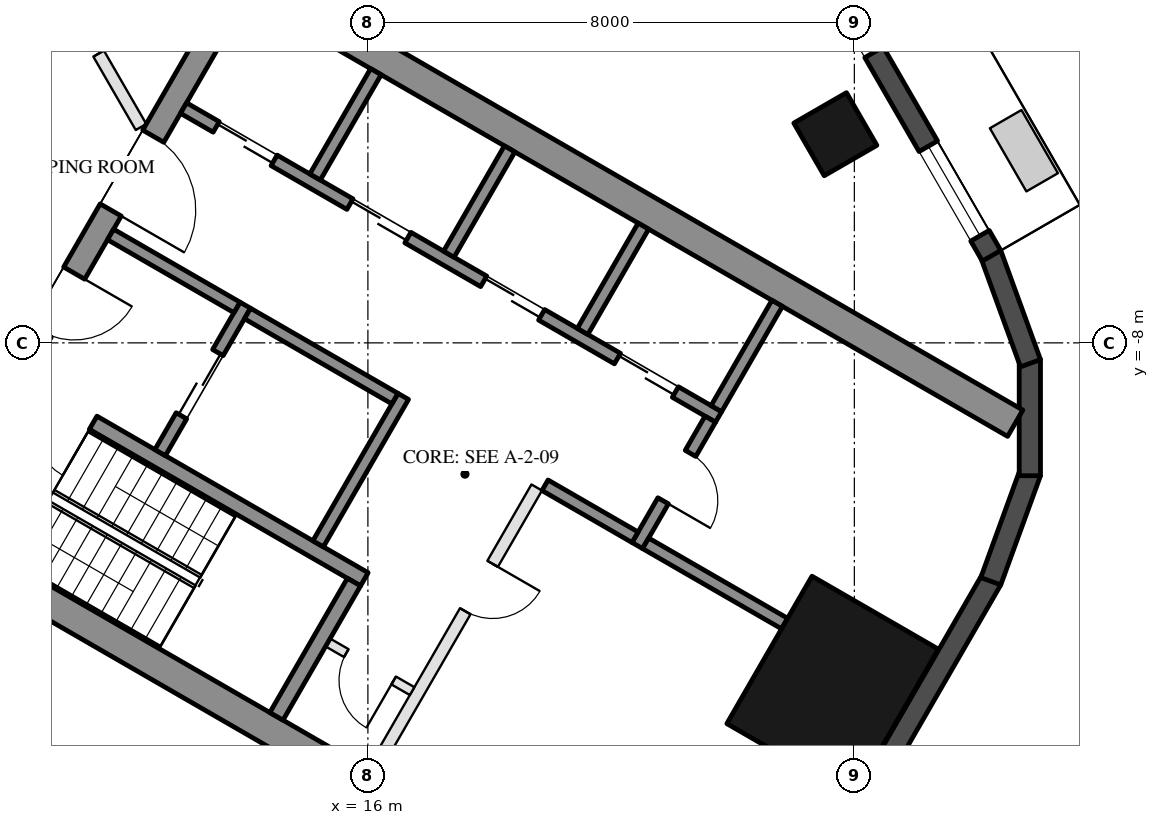
"""IFC4 building model, lengths in metres.
Left out: names, types, materials, properties, quantities, classifications, styles, units other than length and angle.
Written with IfcOpenShell. Run it as: python <this file> out.ifc"""

import sys

from ifc_helpers import new_model, si_unit, direction, frame, frame_2d, origin, origin_2d, place, context, subcontext, project, spatial, rectangle, hollow_rectangle, extrude, element, fill, save


model = new_model("IFC4")
c1 = context("Model", 3, precision=1e-05, world=origin(), true_north=direction((0.0, 1.0)))
c2 = subcontext(c1, "Body", "Model", "MODEL_VIEW")
j1 = project(units=[si_unit("LENGTHUNIT", "METRE"), si_unit("PLANEANGLEUNIT", "RADIAN")], contexts=[c1])
p1 = place(None, origin())
s1 = spatial("IfcSite", under=j1, at=p1, CompositionType="ELEMENT")
p2 = place(p1, origin())
s2 = spatial("IfcBuilding", under=s1, at=p2, CompositionType="ELEMENT")
p3 = place(p2, frame((0.0, 0.0, 46.5)))
s3 = spatial("IfcBuildingStorey", under=s2, at=p3, CompositionType="ELEMENT", Elevation=46.5)
p4 = place(p3, frame((23.688, -4.568, 0.0), z_axis=(0.0, 0.0, 1.0), x_axis=(-0.5, 0.866025403784, 0.0)))
e1 = element("IfcColumn", 1, at=p4, inside=s3, PredefinedType="COLUMN", context=c2, shape_type="SweptSolid", body=[
    extrude(hollow_rectangle(XDim=1.0, YDim=1.0, WallThickness=0.045, at=origin_2d()), origin(), (0.0, 0.0, 1.0), 3.7),
])
p5 = place(p3, frame((23.643, -13.65, 0.0), z_axis=(0.0, 0.0, 1.0), x_axis=(0.5, 0.866025403784, 0.0)))
e2 = element("IfcColumn", 2, at=p5, inside=s3, PredefinedType="COLUMN", context=c2, shape_type="SweptSolid", body=[
    extrude(hollow_rectangle(XDim=2.8, YDim=2.4, WallThickness=0.07, at=origin_2d()), origin(), (0.0, 0.0, 1.0), 3.7),
])
p6 = place(p3, frame((23.427, -16.792, 0.0), z_axis=(0.0, 0.0, 1.0), x_axis=(0.500018773155, 0.866014564827, 0.0)))
e3 = element("IfcWall", 3, at=p6, inside=s3, PredefinedType="SOLIDWALL", context=c2, shape_type="SweptSolid", body=[
    extrude(rectangle(XDim=5.658, YDim=0.35, at=frame_2d((2.829, 0.0))), origin(), (0.0, 0.0, 1.0), 3.55),
])
for number, where, z_axis, x_axis in (
    (4, (26.244, -11.92, 0.0), (0.0, 0.0, 1.0), (0.342, 0.94, 0.0)),
    (5, (26.886, -10.185, 0.0), (0.0, 0.0, 1.0), (0.0, 1.0, 0.0)),
    (6, (26.897, -8.335, 0.0), (0.0, 0.0, 1.0), (-0.342, 0.94, 0.0)),
):
    element("IfcWall", number, at=place(p3, frame(where, z_axis=z_axis, x_axis=x_axis)), inside=s3, PredefinedType="SOLIDWALL", context=c2, shape_type="SweptSolid", body=[
        extrude(rectangle(XDim=1.91, YDim=0.35, at=frame_2d((0.955, 0.0))), origin(), (0.0, 0.0, 1.0), 3.55),
    ])
p7 = place(p3, frame((26.257, -6.567, 0.0), z_axis=(0.0, 0.0, 1.0), x_axis=(-0.500023526245, 0.866011820475, 0.0)))
e7 = element("IfcWall", 7, at=p7, inside=s3, PredefinedType="SOLIDWALL", context=c2, shape_type="SweptSolid", body=[
    extrude(rectangle(XDim=11.816, YDim=0.35, at=frame_2d((5.908, 0.0))), origin(), (0.0, 0.0, 1.0), 3.55),
])
p8 = place(p7, frame((0.38, 0.0, 0.3)))
e8 = element("IfcOpeningElement", 8, at=p8, cuts=e7, PredefinedType="OPENING", context=c2, shape_type="SweptSolid", body=[
    extrude(rectangle(XDim=1.7, YDim=2.65, at=frame_2d((0.85, 1.325))), frame((0.0, 0.185, 0.0), z_axis=(0.0, -1.0, 0.0), x_axis=(1.0, 0.0, 0.0)), (0.0, 0.0, 1.0), 0.37),
])
p9 = place(p7, frame((7.666, 0.0, 0.0)))
e9 = element("IfcOpeningElement", 9, at=p9, cuts=e7, PredefinedType="OPENING", context=c2, shape_type="SweptSolid", body=[
    extrude(rectangle(XDim=2.4, YDim=2.4, at=frame_2d((1.2, 1.2))), frame((0.0, 0.185, 0.0), z_axis=(0.0, -1.0, 0.0), x_axis=(1.0, 0.0, 0.0)), (0.0, 0.0, 1.0), 0.37),
])
p10 = place(p7, frame((3.865, 0.0, 0.3)))
e10 = element("IfcOpeningElement", 10, at=p10, cuts=e7, PredefinedType="OPENING", context=c2, shape_type="SweptSolid", body=[
    extrude(rectangle(XDim=1.6, YDim=2.65, at=frame_2d((0.8, 1.325))), frame((0.0, 0.185, 0.0), z_axis=(0.0, -1.0, 0.0), x_axis=(1.0, 0.0, 0.0)), (0.0, 0.0, 1.0), 0.37),
])
p11 = place(p7, frame((5.765, 0.0, 0.3)))
e11 = element("IfcOpeningElement", 11, at=p11, cuts=e7, PredefinedType="OPENING", context=c2, shape_type="SweptSolid", body=[
    extrude(rectangle(XDim=1.6, YDim=2.65, at=frame_2d((0.8, 1.325))), frame((0.0, 0.185, 0.0), z_axis=(0.0, -1.0, 0.0), x_axis=(1.0, 0.0, 0.0)), (0.0, 0.0, 1.0), 0.37),
])
for number, where, z_axis, x_axis in (
    (12, (8.547, -10.997, 0.0), (0.0, 0.0, 1.0), (0.866, -0.5, 0.0)),
    (13, (13.797, -1.903, 0.0), (0.0, 0.0, 1.0), (0.866, -0.5, 0.0)),
):
    element("IfcWall", number, at=place(p3, frame(where, z_axis=z_axis, x_axis=x_axis)), inside=s3, PredefinedType="SHEAR", context=c2, shape_type="SweptSolid", body=[
        extrude(rectangle(XDim=14.837, YDim=0.5, at=frame_2d((7.418, 0.0))), origin(), (0.0, 0.0, 1.0), 3.5),
    ])
p12 = place(p3, frame((8.845, -10.88, 0.0), z_axis=(0.0, 0.0, 1.0), x_axis=(0.500004234368, 0.866022959057, 0.0)))
e14 = element("IfcWall", 14, at=p12, inside=s3, PredefinedType="SHEAR", context=c2, shape_type="SweptSolid", body=[
    extrude(rectangle(XDim=10.0, YDim=0.4, at=frame_2d((5.0, 0.0))), origin(), (0.0, 0.0, 1.0), 3.5),
])
p13 = place(p12, frame((3.55, 0.0, 0.0)))
e15 = element("IfcOpeningElement", 15, at=p13, cuts=e14, PredefinedType="OPENING", context=c2, shape_type="SweptSolid", body=[
    extrude(rectangle(XDim=1.1, YDim=2.1, at=frame_2d((0.55, 1.05))), frame((0.0, 0.21, 0.0), z_axis=(0.0, -1.0, 0.0), x_axis=(1.0, 0.0, 0.0)), (0.0, 0.0, 1.0), 0.42),
])
p14 = place(p12, frame((5.85, 0.0, 0.0)))
e16 = element("IfcOpeningElement", 16, at=p14, cuts=e14, PredefinedType="OPENING", context=c2, shape_type="SweptSolid", body=[
    extrude(rectangle(XDim=1.4, YDim=2.1, at=frame_2d((0.7, 1.05))), frame((0.0, 0.21, 0.0), z_axis=(0.0, -1.0, 0.0), x_axis=(1.0, 0.0, 0.0)), (0.0, 0.0, 1.0), 0.42),
])
p15 = place(p3, frame((10.356, -8.664, 0.0), z_axis=(0.0, 0.0, 1.0), x_axis=(0.866028629588, -0.499994412703, 0.0)))
e17 = element("IfcWall", 17, at=p15, inside=s3, PredefinedType="SHEAR", context=c2, shape_type="SweptSolid", body=[
    extrude(rectangle(XDim=6.45, YDim=0.25, at=frame_2d((3.225, 0.0))), origin(), (0.0, 0.0, 1.0), 3.5),
])
p16 = place(p15, frame((0.3, 0.0, 0.0)))
e18 = element("IfcOpeningElement", 18, at=p16, cuts=e17, PredefinedType="OPENING", context=c2, shape_type="SweptSolid", body=[
    extrude(rectangle(XDim=1.0, YDim=2.1, at=frame_2d((0.5, 1.05))), frame((0.0, 0.135, 0.0), z_axis=(0.0, -1.0, 0.0), x_axis=(1.0, 0.0, 0.0)), (0.0, 0.0, 1.0), 0.27),
])
p17 = place(p3, frame((14.496, -14.143, 0.0), z_axis=(0.0, 0.0, 1.0), x_axis=(0.500062241894, 0.865989465428, 0.0)))
e19 = element("IfcWall", 19, at=p17, inside=s3, PredefinedType="SHEAR", context=c2, shape_type="SweptSolid", body=[
    extrude(rectangle(XDim=2.55, YDim=0.25, at=frame_2d((1.275, 0.0))), origin(), (0.0, 0.0, 1.0), 3.5),
])
p18 = place(p3, frame((15.181, -11.305, 0.0), z_axis=(0.0, 0.0, 1.0), x_axis=(0.49994636267, 0.866056369097, 0.0)))
e20 = element("IfcWall", 20, at=p18, inside=s3, PredefinedType="SHEAR", context=c2, shape_type="SweptSolid", body=[
    extrude(rectangle(XDim=2.8, YDim=0.2, at=frame_2d((1.4, 0.0))), origin(), (0.0, 0.0, 1.0), 3.5),
])
p19 = place(p3, frame((12.583, -9.805, 0.0), z_axis=(0.0, 0.0, 1.0), x_axis=(0.49994636267, 0.866056369097, 0.0)))
e21 = element("IfcWall", 21, at=p19, inside=s3, PredefinedType="SHEAR", context=c2, shape_type="SweptSolid", body=[
    extrude(rectangle(XDim=2.8, YDim=0.2, at=frame_2d((1.4, 0.0))), origin(), (0.0, 0.0, 1.0), 3.5),
])
p20 = place(p19, frame((0.7, 0.0, 0.0)))
e22 = element("IfcOpeningElement", 22, at=p20, cuts=e21, PredefinedType="OPENING", context=c2, shape_type="SweptSolid", body=[
    extrude(rectangle(XDim=1.2, YDim=2.1, at=frame_2d((0.6, 1.05))), frame((0.0, 0.11, 0.0), z_axis=(0.0, -1.0, 0.0), x_axis=(1.0, 0.0, 0.0)), (0.0, 0.0, 1.0), 0.22),
])
p21 = place(p3, frame((11.768, -6.217, 0.0), z_axis=(0.0, 0.0, 1.0), x_axis=(0.866050077142, -0.499957262057, 0.0)))
e23 = element("IfcWall", 23, at=p21, inside=s3, PredefinedType="SHEAR", context=c2, shape_type="SweptSolid", body=[
    extrude(rectangle(XDim=2.4, YDim=0.2, at=frame_2d((1.2, 0.0))), origin(), (0.0, 0.0, 1.0), 3.5),
])
p22 = place(p3, frame((14.02, -7.517, 0.0), z_axis=(0.0, 0.0, 1.0), x_axis=(0.866034573852, -0.49998411664, 0.0)))
e24 = element("IfcWall", 24, at=p22, inside=s3, PredefinedType="SHEAR", context=c2, shape_type="SweptSolid", body=[
    extrude(rectangle(XDim=2.8, YDim=0.2, at=frame_2d((1.4, 0.0))), origin(), (0.0, 0.0, 1.0), 3.5),
])
p23 = place(p3, frame((12.968, -4.138, 0.0), z_axis=(0.0, 0.0, 1.0), x_axis=(0.866028328073, -0.49999493495, 0.0)))
e25 = element("IfcWall", 25, at=p23, inside=s3, PredefinedType="SHEAR", context=c2, shape_type="SweptSolid", body=[
    extrude(rectangle(XDim=10.16, YDim=0.2, at=frame_2d((5.08, 0.0))), origin(), (0.0, 0.0, 1.0), 3.5),
])
p24 = place(p23, frame((0.62, 0.0, 0.0)))
e26 = element("IfcOpeningElement", 26, at=p24, cuts=e25, PredefinedType="OPENING", context=c2, shape_type="SweptSolid", body=[
    extrude(rectangle(XDim=1.1, YDim=2.1, at=frame_2d((0.55, 1.05))), frame((0.0, 0.11, 0.0), z_axis=(0.0, -1.0, 0.0), x_axis=(1.0, 0.0, 0.0)), (0.0, 0.0, 1.0), 0.22),
])
p25 = place(p23, frame((3.16, 0.0, 0.0)))
e27 = element("IfcOpeningElement", 27, at=p25, cuts=e25, PredefinedType="OPENING", context=c2, shape_type="SweptSolid", body=[
    extrude(rectangle(XDim=1.1, YDim=2.1, at=frame_2d((0.55, 1.05))), frame((0.0, 0.11, 0.0), z_axis=(0.0, -1.0, 0.0), x_axis=(1.0, 0.0, 0.0)), (0.0, 0.0, 1.0), 0.22),
])
p26 = place(p23, frame((5.7, 0.0, 0.0)))
e28 = element("IfcOpeningElement", 28, at=p26, cuts=e25, PredefinedType="OPENING", context=c2, shape_type="SweptSolid", body=[
    extrude(rectangle(XDim=1.1, YDim=2.1, at=frame_2d((0.55, 1.05))), frame((0.0, 0.11, 0.0), z_axis=(0.0, -1.0, 0.0), x_axis=(1.0, 0.0, 0.0)), (0.0, 0.0, 1.0), 0.22),
])
p27 = place(p23, frame((8.24, 0.0, 0.0)))
e29 = element("IfcOpeningElement", 29, at=p27, cuts=e25, PredefinedType="OPENING", context=c2, shape_type="SweptSolid", body=[
    extrude(rectangle(XDim=1.1, YDim=2.1, at=frame_2d((0.55, 1.05))), frame((0.0, 0.11, 0.0), z_axis=(0.0, -1.0, 0.0), x_axis=(1.0, 0.0, 0.0)), (0.0, 0.0, 1.0), 0.22),
])
p28 = place(p3, frame((20.43, -11.333, 0.0), z_axis=(0.0, 0.0, 1.0), x_axis=(0.500001309137, 0.866024647952, 0.0)))
e30 = element("IfcWall", 30, at=p28, inside=s3, PredefinedType="SHEAR", context=c2, shape_type="SweptSolid", body=[
    extrude(rectangle(XDim=2.4, YDim=0.2, at=frame_2d((1.2, 0.0))), origin(), (0.0, 0.0, 1.0), 3.5),
])
p29 = place(p28, frame((0.85, 0.0, 0.0)))
e31 = element("IfcOpeningElement", 31, at=p29, cuts=e30, PredefinedType="OPENING", context=c2, shape_type="SweptSolid", body=[
    extrude(rectangle(XDim=0.9, YDim=2.1, at=frame_2d((0.45, 1.05))), frame((0.0, 0.11, 0.0), z_axis=(0.0, -1.0, 0.0), x_axis=(1.0, 0.0, 0.0)), (0.0, 0.0, 1.0), 0.22),
])
p30 = place(p3, frame((18.913, -10.342, 0.0), z_axis=(0.0, 0.0, 1.0), x_axis=(0.866038183914, -0.499977863513, 0.0)))
e32 = element("IfcWall", 32, at=p30, inside=s3, PredefinedType="SHEAR", context=c2, shape_type="SweptSolid", body=[
    extrude(rectangle(XDim=1.71, YDim=0.2, at=frame_2d((0.855, 0.0))), origin(), (0.0, 0.0, 1.0), 3.5),
])
for number, where, z_axis, x_axis in (
    (33, (15.131, -5.272, 0.0), (0.0, 0.0, 1.0), (0.5, 0.866, 0.0)),
    (34, (17.331, -6.542, 0.0), (0.0, 0.0, 1.0), (0.5, 0.866, 0.0)),
    (35, (19.531, -7.812, 0.0), (0.0, 0.0, 1.0), (0.5, 0.866, 0.0)),
    (36, (21.73, -9.082, 0.0), (0.0, 0.0, 1.0), (0.5, 0.866, 0.0)),
):
    element("IfcWall", number, at=place(p3, frame(where, z_axis=z_axis, x_axis=x_axis)), inside=s3, PredefinedType="SHEAR", context=c2, shape_type="SweptSolid", body=[
        extrude(rectangle(XDim=2.0, YDim=0.2, at=frame_2d((1.0, 0.0))), origin(), (0.0, 0.0, 1.0), 3.5),
    ])
p31 = place(p3, frame((20.567, -11.297, 0.0), z_axis=(0.0, 0.0, 1.0), x_axis=(0.866060851709, -0.499938597367, 0.0)))
e37 = element("IfcWall", 37, at=p31, inside=s3, PredefinedType="SHEAR", context=c2, shape_type="SweptSolid", body=[
    extrude(rectangle(XDim=2.64, YDim=0.2, at=frame_2d((1.32, 0.0))), origin(), (0.0, 0.0, 1.0), 3.5),
])
p32 = place(p3, frame((16.076, -15.055, 0.0), z_axis=(0.0, 0.0, 1.0), x_axis=(0.499995103361, 0.866028230842, 0.0)))
e38 = element("IfcWall", 38, at=p32, inside=s3, PredefinedType="PARTITIONING", context=c2, shape_type="SweptSolid", body=[
    extrude(rectangle(XDim=5.4, YDim=0.2, at=frame_2d((2.7, 0.0))), origin(), (0.0, 0.0, 1.0), 3.5),
])
p33 = place(p32, frame((3.05, 0.0, 0.0)))
e39 = element("IfcOpeningElement", 39, at=p33, cuts=e38, PredefinedType="OPENING", context=c2, shape_type="SweptSolid", body=[
    extrude(rectangle(XDim=0.9, YDim=2.1, at=frame_2d((0.45, 1.05))), frame((0.0, 0.11, 0.0), z_axis=(0.0, -1.0, 0.0), x_axis=(1.0, 0.0, 0.0)), (0.0, 0.0, 1.0), 0.22),
])
p34 = place(p3, frame((15.342, -12.928, 0.0), z_axis=(0.0, 0.0, 1.0), x_axis=(0.865989903783, -0.500061482766, 0.0)))
e40 = element("IfcWall", 40, at=p34, inside=s3, PredefinedType="PARTITIONING", context=c2, shape_type="SweptSolid", body=[
    extrude(rectangle(XDim=1.6, YDim=0.15, at=frame_2d((0.8, 0.0))), origin(), (0.0, 0.0, 1.0), 3.5),
])
p35 = place(p34, frame((0.35, 0.0, 0.0)))
e41 = element("IfcOpeningElement", 41, at=p35, cuts=e40, PredefinedType="OPENING", context=c2, shape_type="SweptSolid", body=[
    extrude(rectangle(XDim=0.9, YDim=2.1, at=frame_2d((0.45, 1.05))), frame((0.0, 0.085, 0.0), z_axis=(0.0, -1.0, 0.0), x_axis=(1.0, 0.0, 0.0)), (0.0, 0.0, 1.0), 0.17),
])
p36 = place(p3, frame((10.375, -1.169, 0.0), z_axis=(0.0, 0.0, 1.0), x_axis=(0.500055316652, -0.865993464345, 0.0)))
e42 = element("IfcWall", 42, at=p36, inside=s3, PredefinedType="PARTITIONING", context=c2, shape_type="SweptSolid", body=[
    extrude(rectangle(XDim=3.788, YDim=0.2, at=frame_2d((1.894, 0.0))), origin(), (0.0, 0.0, 1.0), 2.95),
])
p37 = place(p36, frame((1.394, 0.0, 0.0)))
e43 = element("IfcOpeningElement", 43, at=p37, cuts=e42, PredefinedType="OPENING", context=c2, shape_type="SweptSolid", body=[
    extrude(rectangle(XDim=1.0, YDim=2.1, at=frame_2d((0.5, 1.05))), frame((0.0, 0.11, 0.0), z_axis=(0.0, -1.0, 0.0), x_axis=(1.0, 0.0, 0.0)), (0.0, 0.0, 1.0), 0.22),
])
p38 = place(p8, origin())
e44 = element("IfcWindow", 44, at=p38, inside=s3, PartitioningType="SINGLE_PANEL", PredefinedType="WINDOW", context=c2, shape_type="SweptSolid", body=[
    extrude(rectangle(XDim=1.7, YDim=2.65, at=frame_2d((0.85, 1.325))), frame((0.0, 0.03, 0.0), z_axis=(0.0, -1.0, 0.0), x_axis=(1.0, 0.0, 0.0)), (0.0, 0.0, 1.0), 0.06),
])
fill(e8, e44)
p39 = place(p10, origin())
e45 = element("IfcWindow", 45, at=p39, inside=s3, PartitioningType="SINGLE_PANEL", PredefinedType="WINDOW", context=c2, shape_type="SweptSolid", body=[
    extrude(rectangle(XDim=1.6, YDim=2.65, at=frame_2d((0.8, 1.325))), frame((0.0, 0.03, 0.0), z_axis=(0.0, -1.0, 0.0), x_axis=(1.0, 0.0, 0.0)), (0.0, 0.0, 1.0), 0.06),
])
fill(e10, e45)
p40 = place(p20, origin())
e46 = element("IfcDoor", 46, at=p40, inside=s3, OperationType="DOUBLE_DOOR_SLIDING", PredefinedType="DOOR", context=c2, shape_type="SweptSolid", body=[
    extrude(rectangle(XDim=1.2, YDim=2.1, at=frame_2d((0.6, 1.05))), frame((0.0, 0.025, 0.0), z_axis=(0.0, -1.0, 0.0), x_axis=(1.0, 0.0, 0.0)), (0.0, 0.0, 1.0), 0.05),
])
fill(e22, e46)
p41 = place(p35, frame((0.9, 0.0, 0.0), z_axis=(0.0, 0.0, 1.0), x_axis=(-1.0, 0.0, 0.0)))
e47 = element("IfcDoor", 47, at=p41, inside=s3, OperationType="SINGLE_SWING_LEFT", PredefinedType="DOOR", context=c2, shape_type="SweptSolid", body=[
    extrude(rectangle(XDim=0.9, YDim=2.1, at=frame_2d((0.45, 1.05))), frame((0.0, 0.025, 0.0), z_axis=(0.0, -1.0, 0.0), x_axis=(1.0, 0.0, 0.0)), (0.0, 0.0, 1.0), 0.05),
])
fill(e41, e47)
p42 = place(p24, origin())
e48 = element("IfcDoor", 48, at=p42, inside=s3, OperationType="DOUBLE_DOOR_SLIDING", PredefinedType="DOOR", context=c2, shape_type="SweptSolid", body=[
    extrude(rectangle(XDim=1.1, YDim=2.1, at=frame_2d((0.55, 1.05))), frame((0.0, 0.025, 0.0), z_axis=(0.0, -1.0, 0.0), x_axis=(1.0, 0.0, 0.0)), (0.0, 0.0, 1.0), 0.05),
])
fill(e26, e48)
p43 = place(p25, origin())
e49 = element("IfcDoor", 49, at=p43, inside=s3, OperationType="DOUBLE_DOOR_SLIDING", PredefinedType="DOOR", context=c2, shape_type="SweptSolid", body=[
    extrude(rectangle(XDim=1.1, YDim=2.1, at=frame_2d((0.55, 1.05))), frame((0.0, 0.025, 0.0), z_axis=(0.0, -1.0, 0.0), x_axis=(1.0, 0.0, 0.0)), (0.0, 0.0, 1.0), 0.05),
])
fill(e27, e49)
p44 = place(p26, origin())
e50 = element("IfcDoor", 50, at=p44, inside=s3, OperationType="DOUBLE_DOOR_SLIDING", PredefinedType="DOOR", context=c2, shape_type="SweptSolid", body=[
    extrude(rectangle(XDim=1.1, YDim=2.1, at=frame_2d((0.55, 1.05))), frame((0.0, 0.025, 0.0), z_axis=(0.0, -1.0, 0.0), x_axis=(1.0, 0.0, 0.0)), (0.0, 0.0, 1.0), 0.05),
])
fill(e28, e50)
p45 = place(p27, origin())
e51 = element("IfcDoor", 51, at=p45, inside=s3, OperationType="DOUBLE_DOOR_SLIDING", PredefinedType="DOOR", context=c2, shape_type="SweptSolid", body=[
    extrude(rectangle(XDim=1.1, YDim=2.1, at=frame_2d((0.55, 1.05))), frame((0.0, 0.025, 0.0), z_axis=(0.0, -1.0, 0.0), x_axis=(1.0, 0.0, 0.0)), (0.0, 0.0, 1.0), 0.05),
])
fill(e29, e51)
p46 = place(p29, frame((0.9, 0.0, 0.0), z_axis=(0.0, 0.0, 1.0), x_axis=(-1.0, 0.0, 0.0)))
e52 = element("IfcDoor", 52, at=p46, inside=s3, OperationType="SINGLE_SWING_RIGHT", PredefinedType="DOOR", context=c2, shape_type="SweptSolid", body=[
    extrude(rectangle(XDim=0.9, YDim=2.1, at=frame_2d((0.45, 1.05))), frame((0.0, 0.025, 0.0), z_axis=(0.0, -1.0, 0.0), x_axis=(1.0, 0.0, 0.0)), (0.0, 0.0, 1.0), 0.05),
])
fill(e31, e52)
p47 = place(p33, frame((0.9, 0.0, 0.0), z_axis=(0.0, 0.0, 1.0), x_axis=(-1.0, 0.0, 0.0)))
e53 = element("IfcDoor", 53, at=p47, inside=s3, OperationType="SINGLE_SWING_LEFT", PredefinedType="DOOR", context=c2, shape_type="SweptSolid", body=[
    extrude(rectangle(XDim=0.9, YDim=2.1, at=frame_2d((0.45, 1.05))), frame((0.0, 0.025, 0.0), z_axis=(0.0, -1.0, 0.0), x_axis=(1.0, 0.0, 0.0)), (0.0, 0.0, 1.0), 0.05),
])
fill(e39, e53)
p48 = place(p13, frame((1.1, 0.0, 0.0), z_axis=(0.0, 0.0, 1.0), x_axis=(-1.0, 0.0, 0.0)))
e54 = element("IfcDoor", 54, at=p48, inside=s3, OperationType="SINGLE_SWING_LEFT", PredefinedType="DOOR", context=c2, shape_type="SweptSolid", body=[
    extrude(rectangle(XDim=1.1, YDim=2.1, at=frame_2d((0.55, 1.05))), frame((0.0, 0.025, 0.0), z_axis=(0.0, -1.0, 0.0), x_axis=(1.0, 0.0, 0.0)), (0.0, 0.0, 1.0), 0.05),
])
fill(e15, e54)
p49 = place(p14, frame((1.4, 0.0, 0.0), z_axis=(0.0, 0.0, 1.0), x_axis=(-1.0, 0.0, 0.0)))
e55 = element("IfcDoor", 55, at=p49, inside=s3, OperationType="DOUBLE_DOOR_SINGLE_SWING", PredefinedType="DOOR", context=c2, shape_type="SweptSolid", body=[
    extrude(rectangle(XDim=1.4, YDim=2.1, at=frame_2d((0.7, 1.05))), frame((0.0, 0.025, 0.0), z_axis=(0.0, -1.0, 0.0), x_axis=(1.0, 0.0, 0.0)), (0.0, 0.0, 1.0), 0.05),
])
fill(e16, e55)
p50 = place(p16, frame((1.0, 0.0, 0.0), z_axis=(0.0, 0.0, 1.0), x_axis=(-1.0, 0.0, 0.0)))
e56 = element("IfcDoor", 56, at=p50, inside=s3, OperationType="SINGLE_SWING_LEFT", PredefinedType="DOOR", context=c2, shape_type="SweptSolid", body=[
    extrude(rectangle(XDim=1.0, YDim=2.1, at=frame_2d((0.5, 1.05))), frame((0.0, 0.025, 0.0), z_axis=(0.0, -1.0, 0.0), x_axis=(1.0, 0.0, 0.0)), (0.0, 0.0, 1.0), 0.05),
])
fill(e18, e56)
p51 = place(p37, origin())
e57 = element("IfcDoor", 57, at=p51, inside=s3, OperationType="SINGLE_SWING_LEFT", PredefinedType="DOOR", context=c2, shape_type="SweptSolid", body=[
    extrude(rectangle(XDim=1.0, YDim=2.1, at=frame_2d((0.5, 1.05))), frame((0.0, 0.025, 0.0), z_axis=(0.0, -1.0, 0.0), x_axis=(1.0, 0.0, 0.0)), (0.0, 0.0, 1.0), 0.05),
])
fill(e43, e57)
save(model, sys.argv[1])
